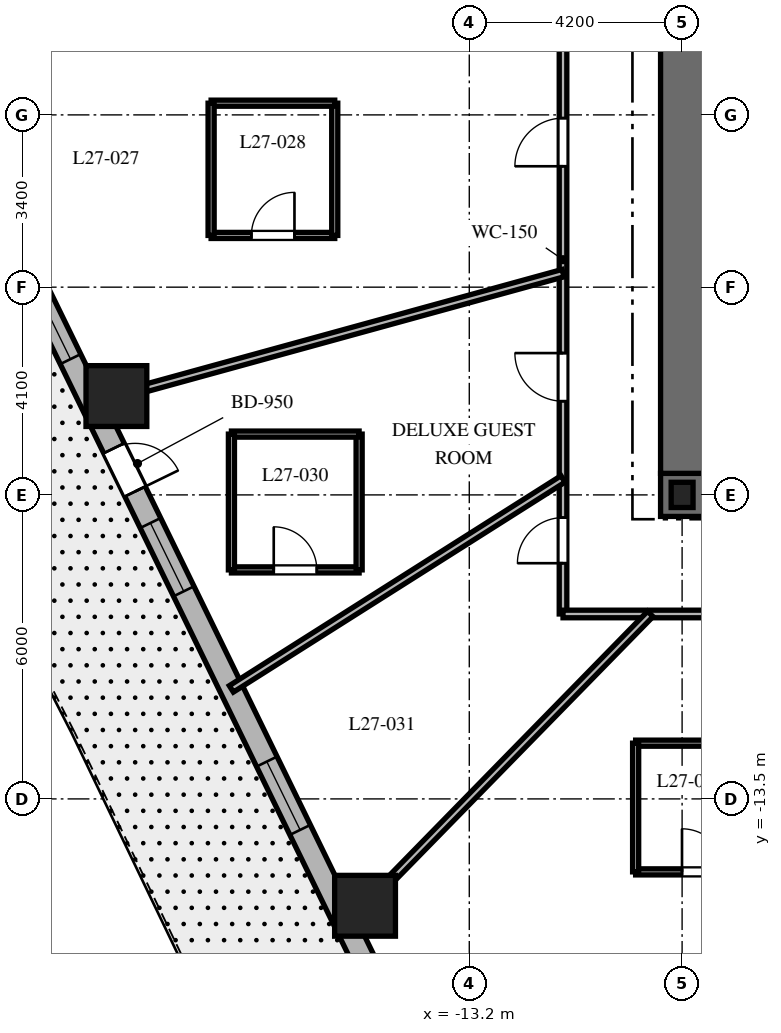
"""IFC4 building model, lengths in metres.
Left out: names, types, materials, properties, quantities, classifications, styles, units other than length and angle.
Written with IfcOpenShell. Run it as: python <this file> out.ifc"""

import sys

from ifc_helpers import new_model, si_unit, direction, frame, frame_2d, origin, origin_2d, place, context, subcontext, project, spatial, rectangle, i_section, extrude, element, fill, save


model = new_model("IFC4")
c1 = context("Model", 3, precision=1e-05, world=origin(), true_north=direction((0.0, 1.0)))
c2 = subcontext(c1, "Body", "Model", "MODEL_VIEW")
j1 = project(units=[si_unit("LENGTHUNIT", "METRE"), si_unit("PLANEANGLEUNIT", "RADIAN")], contexts=[c1])
p1 = place(None, origin())
s1 = spatial("IfcSite", under=j1, at=p1, CompositionType="ELEMENT")
p2 = place(p1, origin())
s2 = spatial("IfcBuilding", under=s1, at=p2, CompositionType="ELEMENT")
p3 = place(p2, frame((0.0, 0.0, 113.6)))
s3 = spatial("IfcBuildingStorey", under=s2, at=p3, CompositionType="ELEMENT", Elevation=113.6)
p4 = place(p3, frame((-9.425, -7.5, 0.0), z_axis=(0.0, 0.0, 1.0), x_axis=(1.0, 0.0, 0.0)))
e1 = element("IfcWall", 1, at=p4, inside=s3, PredefinedType="SHEAR", context=c2, shape_type="SweptSolid", body=[
    extrude(rectangle(XDim=18.85, YDim=0.85, at=frame_2d((9.425, 0.0))), origin(), (0.0, 0.0, 1.0), 3.7),
])
p5 = place(p4, frame((9.475, 0.0, 0.0)))
e2 = element("IfcOpeningElement", 2, at=p5, cuts=e1, PredefinedType="OPENING", context=c2, shape_type="SweptSolid", body=[
    extrude(rectangle(XDim=1.0, YDim=2.15, at=frame_2d((0.5, 1.075))), frame((0.0, 0.435, 0.0), z_axis=(0.0, -1.0, 0.0), x_axis=(1.0, 0.0, 0.0)), (0.0, 0.0, 1.0), 0.87),
])
p6 = place(p3, frame((-9.0, -7.075, 0.0), z_axis=(0.0, 0.0, 1.0), x_axis=(0.0, 1.0, 0.0)))
e3 = element("IfcWall", 3, at=p6, inside=s3, PredefinedType="SHEAR", context=c2, shape_type="SweptSolid", body=[
    extrude(rectangle(XDim=14.15, YDim=0.85, at=frame_2d((7.075, 0.0))), origin(), (0.0, 0.0, 1.0), 3.7),
])
p7 = place(p6, frame((10.2, 0.0, 0.0)))
e4 = element("IfcOpeningElement", 4, at=p7, cuts=e3, PredefinedType="OPENING", context=c2, shape_type="SweptSolid", body=[
    extrude(rectangle(XDim=1.05, YDim=2.15, at=frame_2d((0.525, 1.075))), frame((0.0, 0.435, 0.0), z_axis=(0.0, -1.0, 0.0), x_axis=(1.0, 0.0, 0.0)), (0.0, 0.0, 1.0), 0.87),
])
p8 = place(p3, frame((-9.0, -7.5, 0.0), z_axis=(0.0, 0.0, 1.0), x_axis=(1.0, 0.0, 0.0)))
e5 = element("IfcColumn", 5, at=p8, inside=s3, PredefinedType="COLUMN", context=c2, shape_type="SweptSolid", body=[
    extrude(i_section(OverallWidth=0.432, OverallDepth=0.498, WebThickness=0.056, FlangeThickness=0.089, at=origin_2d()), origin(), (0.0, 0.0, 1.0), 3.7),
])
for number, where, z_axis, x_axis in (
    (6, (-20.164, -5.549, 0.0), (0.0, 0.0, 1.0), (1.0, 0.0, 0.0)),
    (7, (-15.257, -15.609, 0.0), (0.0, 0.0, 1.0), (1.0, 0.0, 0.0)),
):
    element("IfcColumn", number, at=place(p3, frame(where, z_axis=z_axis, x_axis=x_axis)), inside=s3, PredefinedType="COLUMN", context=c2, shape_type="SweptSolid", body=[
        extrude(rectangle(XDim=1.2, YDim=1.2, at=origin_2d()), origin(), (0.0, 0.0, 1.0), 3.7),
    ])
p9 = place(p3, frame((-15.992, 18.777, 0.0), z_axis=(0.0, 0.0, 1.0), x_axis=(-0.325606988926, -0.945505202927, 0.0)))
e8 = element("IfcWall", 8, at=p9, inside=s3, PredefinedType="SOLIDWALL", context=c2, shape_type="SweptSolid", body=[
    extrude(rectangle(XDim=19.669, YDim=0.45, at=frame_2d((9.835, 0.0))), origin(), (0.0, 0.0, 1.0), 3.4),
])
p10 = place(p9, frame((4.909, 0.0, 0.0)))
e9 = element("IfcOpeningElement", 9, at=p10, cuts=e8, PredefinedType="OPENING", context=c2, shape_type="SweptSolid", body=[
    extrude(rectangle(XDim=1.0, YDim=2.15, at=frame_2d((0.5, 1.075))), frame((0.0, 0.235, 0.0), z_axis=(0.0, -1.0, 0.0), x_axis=(1.0, 0.0, 0.0)), (0.0, 0.0, 1.0), 0.47),
])
p11 = place(p9, frame((1.197, 0.0, 0.8)))
e10 = element("IfcOpeningElement", 10, at=p11, cuts=e8, PredefinedType="OPENING", context=c2, shape_type="SweptSolid", body=[
    extrude(rectangle(XDim=1.5, YDim=1.8, at=frame_2d((0.75, 0.9))), frame((0.0, 0.235, 0.0), z_axis=(0.0, -1.0, 0.0), x_axis=(1.0, 0.0, 0.0)), (0.0, 0.0, 1.0), 0.47),
])
p12 = place(p9, frame((6.714, 0.0, 0.8)))
e11 = element("IfcOpeningElement", 11, at=p12, cuts=e8, PredefinedType="OPENING", context=c2, shape_type="SweptSolid", body=[
    extrude(rectangle(XDim=1.5, YDim=1.8, at=frame_2d((0.75, 0.9))), frame((0.0, 0.235, 0.0), z_axis=(0.0, -1.0, 0.0), x_axis=(1.0, 0.0, 0.0)), (0.0, 0.0, 1.0), 0.47),
])
p13 = place(p9, frame((11.53, 0.0, 0.8)))
e12 = element("IfcOpeningElement", 12, at=p13, cuts=e8, PredefinedType="OPENING", context=c2, shape_type="SweptSolid", body=[
    extrude(rectangle(XDim=1.5, YDim=1.8, at=frame_2d((0.75, 0.9))), frame((0.0, 0.235, 0.0), z_axis=(0.0, -1.0, 0.0), x_axis=(1.0, 0.0, 0.0)), (0.0, 0.0, 1.0), 0.47),
])
p14 = place(p9, frame((16.918, 0.0, 0.8)))
e13 = element("IfcOpeningElement", 13, at=p14, cuts=e8, PredefinedType="OPENING", context=c2, shape_type="SweptSolid", body=[
    extrude(rectangle(XDim=1.5, YDim=1.8, at=frame_2d((0.75, 0.9))), frame((0.0, 0.235, 0.0), z_axis=(0.0, -1.0, 0.0), x_axis=(1.0, 0.0, 0.0)), (0.0, 0.0, 1.0), 0.47),
])
p15 = place(p3, frame((-22.238, -2.427, 0.0), z_axis=(0.0, 0.0, 1.0), x_axis=(0.438374803278, -0.898792262901, 0.0)))
e14 = element("IfcWall", 14, at=p15, inside=s3, PredefinedType="SOLIDWALL", context=c2, shape_type="SweptSolid", body=[
    extrude(rectangle(XDim=18.618, YDim=0.45, at=frame_2d((9.309, 0.0))), origin(), (0.0, 0.0, 1.0), 3.4),
])
p16 = place(p15, frame((4.62, 0.0, 0.0)))
e15 = element("IfcOpeningElement", 15, at=p16, cuts=e14, PredefinedType="OPENING", context=c2, shape_type="SweptSolid", body=[
    extrude(rectangle(XDim=0.95, YDim=2.15, at=frame_2d((0.475, 1.075))), frame((0.0, 0.235, 0.0), z_axis=(0.0, -1.0, 0.0), x_axis=(1.0, 0.0, 0.0)), (0.0, 0.0, 1.0), 0.47),
])
p17 = place(p15, frame((1.163, 0.0, 0.8)))
e16 = element("IfcOpeningElement", 16, at=p17, cuts=e14, PredefinedType="OPENING", context=c2, shape_type="SweptSolid", body=[
    extrude(rectangle(XDim=1.5, YDim=1.8, at=frame_2d((0.75, 0.9))), frame((0.0, 0.235, 0.0), z_axis=(0.0, -1.0, 0.0), x_axis=(1.0, 0.0, 0.0)), (0.0, 0.0, 1.0), 0.47),
])
p18 = place(p15, frame((6.262, 0.0, 0.8)))
e17 = element("IfcOpeningElement", 17, at=p18, cuts=e14, PredefinedType="OPENING", context=c2, shape_type="SweptSolid", body=[
    extrude(rectangle(XDim=1.5, YDim=1.8, at=frame_2d((0.75, 0.9))), frame((0.0, 0.235, 0.0), z_axis=(0.0, -1.0, 0.0), x_axis=(1.0, 0.0, 0.0)), (0.0, 0.0, 1.0), 0.47),
])
p19 = place(p15, frame((11.501, 0.0, 0.8)))
e18 = element("IfcOpeningElement", 18, at=p19, cuts=e14, PredefinedType="OPENING", context=c2, shape_type="SweptSolid", body=[
    extrude(rectangle(XDim=1.5, YDim=1.8, at=frame_2d((0.75, 0.9))), frame((0.0, 0.235, 0.0), z_axis=(0.0, -1.0, 0.0), x_axis=(1.0, 0.0, 0.0)), (0.0, 0.0, 1.0), 0.47),
])
p20 = place(p15, frame((16.006, 0.0, 0.8)))
e19 = element("IfcOpeningElement", 19, at=p20, cuts=e14, PredefinedType="OPENING", context=c2, shape_type="SweptSolid", body=[
    extrude(rectangle(XDim=1.5, YDim=1.8, at=frame_2d((0.75, 0.9))), frame((0.0, 0.235, 0.0), z_axis=(0.0, -1.0, 0.0), x_axis=(1.0, 0.0, 0.0)), (0.0, 0.0, 1.0), 0.47),
])
p21 = place(p3, frame((-11.35, -9.85, 0.0), z_axis=(0.0, 0.0, 1.0), x_axis=(0.0, 1.0, 0.0)))
e20 = element("IfcWall", 20, at=p21, inside=s3, PredefinedType="PARTITIONING", context=c2, shape_type="SweptSolid", body=[
    extrude(rectangle(XDim=19.7, YDim=0.15, at=frame_2d((9.85, 0.0))), origin(), (0.0, 0.0, 1.0), 2.84),
])
p22 = place(p21, frame((17.197, 0.0, 0.0)))
e21 = element("IfcOpeningElement", 21, at=p22, cuts=e20, PredefinedType="OPENING", context=c2, shape_type="SweptSolid", body=[
    extrude(rectangle(XDim=0.9, YDim=2.03, at=frame_2d((0.45, 1.015))), frame((0.0, 0.085, 0.0), z_axis=(0.0, -1.0, 0.0), x_axis=(1.0, 0.0, 0.0)), (0.0, 0.0, 1.0), 0.17),
])
p23 = place(p21, frame((13.408, 0.0, 0.0)))
e22 = element("IfcOpeningElement", 22, at=p23, cuts=e20, PredefinedType="OPENING", context=c2, shape_type="SweptSolid", body=[
    extrude(rectangle(XDim=0.95, YDim=2.03, at=frame_2d((0.475, 1.015))), frame((0.0, 0.085, 0.0), z_axis=(0.0, -1.0, 0.0), x_axis=(1.0, 0.0, 0.0)), (0.0, 0.0, 1.0), 0.17),
])
p24 = place(p21, frame((8.836, 0.0, 0.0)))
e23 = element("IfcOpeningElement", 23, at=p24, cuts=e20, PredefinedType="OPENING", context=c2, shape_type="SweptSolid", body=[
    extrude(rectangle(XDim=0.95, YDim=2.03, at=frame_2d((0.475, 1.015))), frame((0.0, 0.085, 0.0), z_axis=(0.0, -1.0, 0.0), x_axis=(1.0, 0.0, 0.0)), (0.0, 0.0, 1.0), 0.17),
])
p25 = place(p21, frame((4.199, 0.0, 0.0)))
e24 = element("IfcOpeningElement", 24, at=p25, cuts=e20, PredefinedType="OPENING", context=c2, shape_type="SweptSolid", body=[
    extrude(rectangle(XDim=0.95, YDim=2.03, at=frame_2d((0.475, 1.015))), frame((0.0, 0.085, 0.0), z_axis=(0.0, -1.0, 0.0), x_axis=(1.0, 0.0, 0.0)), (0.0, 0.0, 1.0), 0.17),
])
p26 = place(p21, frame((1.002, 0.0, 0.0)))
e25 = element("IfcOpeningElement", 25, at=p26, cuts=e20, PredefinedType="OPENING", context=c2, shape_type="SweptSolid", body=[
    extrude(rectangle(XDim=0.9, YDim=2.03, at=frame_2d((0.45, 1.015))), frame((0.0, 0.085, 0.0), z_axis=(0.0, -1.0, 0.0), x_axis=(1.0, 0.0, 0.0)), (0.0, 0.0, 1.0), 0.17),
])
p27 = place(p3, frame((11.35, -9.85, 0.0), z_axis=(0.0, 0.0, 1.0), x_axis=(-1.0, 0.0, 0.0)))
e26 = element("IfcWall", 26, at=p27, inside=s3, PredefinedType="PARTITIONING", context=c2, shape_type="SweptSolid", body=[
    extrude(rectangle(XDim=22.7, YDim=0.15, at=frame_2d((11.35, 0.0))), origin(), (0.0, 0.0, 1.0), 2.84),
])
p28 = place(p27, frame((17.237, 0.0, 0.0)))
e27 = element("IfcOpeningElement", 27, at=p28, cuts=e26, PredefinedType="OPENING", context=c2, shape_type="SweptSolid", body=[
    extrude(rectangle(XDim=0.95, YDim=2.03, at=frame_2d((0.475, 1.015))), frame((0.0, 0.085, 0.0), z_axis=(0.0, -1.0, 0.0), x_axis=(1.0, 0.0, 0.0)), (0.0, 0.0, 1.0), 0.17),
])
p29 = place(p27, frame((12.192, 0.0, 0.0)))
e28 = element("IfcOpeningElement", 28, at=p29, cuts=e26, PredefinedType="OPENING", context=c2, shape_type="SweptSolid", body=[
    extrude(rectangle(XDim=0.95, YDim=2.03, at=frame_2d((0.475, 1.015))), frame((0.0, 0.085, 0.0), z_axis=(0.0, -1.0, 0.0), x_axis=(1.0, 0.0, 0.0)), (0.0, 0.0, 1.0), 0.17),
])
p30 = place(p27, frame((8.757, 0.0, 0.0)))
e29 = element("IfcOpeningElement", 29, at=p30, cuts=e26, PredefinedType="OPENING", context=c2, shape_type="SweptSolid", body=[
    extrude(rectangle(XDim=0.95, YDim=2.03, at=frame_2d((0.475, 1.015))), frame((0.0, 0.085, 0.0), z_axis=(0.0, -1.0, 0.0), x_axis=(1.0, 0.0, 0.0)), (0.0, 0.0, 1.0), 0.17),
])
p31 = place(p27, frame((3.399, 0.0, 0.0)))
e30 = element("IfcOpeningElement", 30, at=p31, cuts=e26, PredefinedType="OPENING", context=c2, shape_type="SweptSolid", body=[
    extrude(rectangle(XDim=0.95, YDim=2.03, at=frame_2d((0.475, 1.015))), frame((0.0, 0.085, 0.0), z_axis=(0.0, -1.0, 0.0), x_axis=(1.0, 0.0, 0.0)), (0.0, 0.0, 1.0), 0.17),
])
p32 = place(p3, frame((-11.35, -3.123, 0.0), z_axis=(0.0, 0.0, 1.0), x_axis=(-0.964151983214, -0.265350623261, 0.0)))
e31 = element("IfcWall", 31, at=p32, inside=s3, PredefinedType="PARTITIONING", context=c2, shape_type="SweptSolid", body=[
    extrude(rectangle(XDim=9.645, YDim=0.15, at=frame_2d((4.823, 0.0))), origin(), (0.0, 0.0, 1.0), 2.54),
])
p33 = place(p3, frame((-11.35, -7.185, 0.0), z_axis=(0.0, 0.0, 1.0), x_axis=(-0.844928274737, -0.534879622485, 0.0)))
e32 = element("IfcWall", 32, at=p33, inside=s3, PredefinedType="PARTITIONING", context=c2, shape_type="SweptSolid", body=[
    extrude(rectangle(XDim=7.747, YDim=0.15, at=frame_2d((3.874, 0.0))), origin(), (0.0, 0.0, 1.0), 2.54),
])
p34 = place(p3, frame((-9.628, -9.85, 0.0), z_axis=(0.0, 0.0, 1.0), x_axis=(-0.698992824326, -0.715128681805, 0.0)))
e33 = element("IfcWall", 33, at=p34, inside=s3, PredefinedType="PARTITIONING", context=c2, shape_type="SweptSolid", body=[
    extrude(rectangle(XDim=8.579, YDim=0.15, at=frame_2d((4.29, 0.0))), origin(), (0.0, 0.0, 1.0), 2.54),
])
p35 = place(p3, frame((-18.295, -2.379, 0.0), z_axis=(0.0, 0.0, 1.0), x_axis=(1.0, 0.0, 0.0)))
e34 = element("IfcWall", 34, at=p35, inside=s3, PredefinedType="PARTITIONING", context=c2, shape_type="SweptSolid", body=[
    extrude(rectangle(XDim=2.44, YDim=0.12, at=frame_2d((1.22, 0.0))), origin(), (0.0, 0.0, 1.0), 2.84),
])
p36 = place(p35, frame((0.795, 0.0, 0.0)))
e35 = element("IfcOpeningElement", 35, at=p36, cuts=e34, PredefinedType="OPENING", context=c2, shape_type="SweptSolid", body=[
    extrude(rectangle(XDim=0.85, YDim=2.03, at=frame_2d((0.425, 1.015))), frame((0.0, 0.07, 0.0), z_axis=(0.0, -1.0, 0.0), x_axis=(1.0, 0.0, 0.0)), (0.0, 0.0, 1.0), 0.14),
])
p37 = place(p3, frame((-15.855, -2.379, 0.0), z_axis=(0.0, 0.0, 1.0), x_axis=(0.0, 1.0, 0.0)))
e36 = element("IfcWall", 36, at=p37, inside=s3, PredefinedType="PARTITIONING", context=c2, shape_type="SweptSolid", body=[
    extrude(rectangle(XDim=2.61, YDim=0.12, at=frame_2d((1.305, 0.0))), origin(), (0.0, 0.0, 1.0), 3.4),
])
p38 = place(p3, frame((-15.855, 0.231, 0.0), z_axis=(0.0, 0.0, 1.0), x_axis=(-1.0, 0.0, 0.0)))
e37 = element("IfcWall", 37, at=p38, inside=s3, PredefinedType="PARTITIONING", context=c2, shape_type="SweptSolid", body=[
    extrude(rectangle(XDim=2.44, YDim=0.12, at=frame_2d((1.22, 0.0))), origin(), (0.0, 0.0, 1.0), 2.84),
])
p39 = place(p3, frame((-18.295, 0.231, 0.0), z_axis=(0.0, 0.0, 1.0), x_axis=(0.0, -1.0, 0.0)))
e38 = element("IfcWall", 38, at=p39, inside=s3, PredefinedType="PARTITIONING", context=c2, shape_type="SweptSolid", body=[
    extrude(rectangle(XDim=2.61, YDim=0.12, at=frame_2d((1.305, 0.0))), origin(), (0.0, 0.0, 1.0), 3.4),
])
p40 = place(p3, frame((-17.894, -8.98, 0.0), z_axis=(0.0, 0.0, 1.0), x_axis=(1.0, 0.0, 0.0)))
e39 = element("IfcWall", 39, at=p40, inside=s3, PredefinedType="PARTITIONING", context=c2, shape_type="SweptSolid", body=[
    extrude(rectangle(XDim=2.52, YDim=0.12, at=frame_2d((1.26, 0.0))), origin(), (0.0, 0.0, 1.0), 3.4),
])
p41 = place(p40, frame((0.835, 0.0, 0.0)))
e40 = element("IfcOpeningElement", 40, at=p41, cuts=e39, PredefinedType="OPENING", context=c2, shape_type="SweptSolid", body=[
    extrude(rectangle(XDim=0.85, YDim=2.03, at=frame_2d((0.425, 1.015))), frame((0.0, 0.07, 0.0), z_axis=(0.0, -1.0, 0.0), x_axis=(1.0, 0.0, 0.0)), (0.0, 0.0, 1.0), 0.14),
])
p42 = place(p3, frame((-15.374, -8.98, 0.0), z_axis=(0.0, 0.0, 1.0), x_axis=(0.0, 1.0, 0.0)))
e41 = element("IfcWall", 41, at=p42, inside=s3, PredefinedType="PARTITIONING", context=c2, shape_type="SweptSolid", body=[
    extrude(rectangle(XDim=2.68, YDim=0.12, at=frame_2d((1.34, 0.0))), origin(), (0.0, 0.0, 1.0), 2.84),
])
p43 = place(p3, frame((-15.374, -6.3, 0.0), z_axis=(0.0, 0.0, 1.0), x_axis=(-1.0, 0.0, 0.0)))
e42 = element("IfcWall", 42, at=p43, inside=s3, PredefinedType="PARTITIONING", context=c2, shape_type="SweptSolid", body=[
    extrude(rectangle(XDim=2.52, YDim=0.12, at=frame_2d((1.26, 0.0))), origin(), (0.0, 0.0, 1.0), 2.84),
])
p44 = place(p3, frame((-17.894, -6.3, 0.0), z_axis=(0.0, 0.0, 1.0), x_axis=(0.0, -1.0, 0.0)))
e43 = element("IfcWall", 43, at=p44, inside=s3, PredefinedType="PARTITIONING", context=c2, shape_type="SweptSolid", body=[
    extrude(rectangle(XDim=2.68, YDim=0.12, at=frame_2d((1.34, 0.0))), origin(), (0.0, 0.0, 1.0), 3.4),
])
p45 = place(p3, frame((-9.917, -14.94, 0.0), z_axis=(0.0, 0.0, 1.0), x_axis=(1.0, 0.0, 0.0)))
e44 = element("IfcWall", 44, at=p45, inside=s3, PredefinedType="PARTITIONING", context=c2, shape_type="SweptSolid", body=[
    extrude(rectangle(XDim=2.68, YDim=0.12, at=frame_2d((1.34, 0.0))), origin(), (0.0, 0.0, 1.0), 2.972),
])
p46 = place(p45, frame((0.915, 0.0, 0.0)))
e45 = element("IfcOpeningElement", 45, at=p46, cuts=e44, PredefinedType="OPENING", context=c2, shape_type="SweptSolid", body=[
    extrude(rectangle(XDim=0.85, YDim=2.03, at=frame_2d((0.425, 1.015))), frame((0.0, 0.07, 0.0), z_axis=(0.0, -1.0, 0.0), x_axis=(1.0, 0.0, 0.0)), (0.0, 0.0, 1.0), 0.14),
])
p47 = place(p3, frame((-7.237, -12.4, 0.0), z_axis=(0.0, 0.0, 1.0), x_axis=(-1.0, 0.0, 0.0)))
e46 = element("IfcWall", 46, at=p47, inside=s3, PredefinedType="PARTITIONING", context=c2, shape_type="SweptSolid", body=[
    extrude(rectangle(XDim=2.68, YDim=0.12, at=frame_2d((1.34, 0.0))), origin(), (0.0, 0.0, 1.0), 2.84),
])
p48 = place(p3, frame((-9.917, -12.4, 0.0), z_axis=(0.0, 0.0, 1.0), x_axis=(0.0, -1.0, 0.0)))
e47 = element("IfcWall", 47, at=p48, inside=s3, PredefinedType="PARTITIONING", context=c2, shape_type="SweptSolid", body=[
    extrude(rectangle(XDim=2.54, YDim=0.12, at=frame_2d((1.27, 0.0))), origin(), (0.0, 0.0, 1.0), 2.972),
])
p49 = place(p16, origin())
e48 = element("IfcDoor", 48, at=p49, inside=s3, OperationType="SINGLE_SWING_RIGHT", PredefinedType="DOOR", context=c2, shape_type="SweptSolid", body=[
    extrude(rectangle(XDim=0.95, YDim=2.15, at=frame_2d((0.475, 1.075))), frame((0.0, 0.025, 0.0), z_axis=(0.0, -1.0, 0.0), x_axis=(1.0, 0.0, 0.0)), (0.0, 0.0, 1.0), 0.05),
])
fill(e15, e48)
p50 = place(p17, origin())
e49 = element("IfcWindow", 49, at=p50, inside=s3, PartitioningType="SINGLE_PANEL", PredefinedType="WINDOW", context=c2, shape_type="SweptSolid", body=[
    extrude(rectangle(XDim=1.5, YDim=1.8, at=frame_2d((0.75, 0.9))), frame((0.0, 0.03, 0.0), z_axis=(0.0, -1.0, 0.0), x_axis=(1.0, 0.0, 0.0)), (0.0, 0.0, 1.0), 0.06),
])
fill(e16, e49)
p51 = place(p18, origin())
e50 = element("IfcWindow", 50, at=p51, inside=s3, PartitioningType="SINGLE_PANEL", PredefinedType="WINDOW", context=c2, shape_type="SweptSolid", body=[
    extrude(rectangle(XDim=1.5, YDim=1.8, at=frame_2d((0.75, 0.9))), frame((0.0, 0.03, 0.0), z_axis=(0.0, -1.0, 0.0), x_axis=(1.0, 0.0, 0.0)), (0.0, 0.0, 1.0), 0.06),
])
fill(e17, e50)
p52 = place(p19, origin())
e51 = element("IfcWindow", 51, at=p52, inside=s3, PartitioningType="SINGLE_PANEL", PredefinedType="WINDOW", context=c2, shape_type="SweptSolid", body=[
    extrude(rectangle(XDim=1.5, YDim=1.8, at=frame_2d((0.75, 0.9))), frame((0.0, 0.03, 0.0), z_axis=(0.0, -1.0, 0.0), x_axis=(1.0, 0.0, 0.0)), (0.0, 0.0, 1.0), 0.06),
])
fill(e18, e51)
p53 = place(p24, origin())
e52 = element("IfcDoor", 52, at=p53, inside=s3, OperationType="SINGLE_SWING_LEFT", PredefinedType="DOOR", context=c2, shape_type="SweptSolid", body=[
    extrude(rectangle(XDim=0.95, YDim=2.03, at=frame_2d((0.475, 1.015))), frame((0.0, 0.025, 0.0), z_axis=(0.0, -1.0, 0.0), x_axis=(1.0, 0.0, 0.0)), (0.0, 0.0, 1.0), 0.05),
])
fill(e23, e52)
p54 = place(p36, origin())
e53 = element("IfcDoor", 53, at=p54, inside=s3, OperationType="SINGLE_SWING_RIGHT", PredefinedType="DOOR", context=c2, shape_type="SweptSolid", body=[
    extrude(rectangle(XDim=0.85, YDim=2.03, at=frame_2d((0.425, 1.015))), frame((0.0, 0.025, 0.0), z_axis=(0.0, -1.0, 0.0), x_axis=(1.0, 0.0, 0.0)), (0.0, 0.0, 1.0), 0.05),
])
fill(e35, e53)
p55 = place(p25, origin())
e54 = element("IfcDoor", 54, at=p55, inside=s3, OperationType="SINGLE_SWING_RIGHT", PredefinedType="DOOR", context=c2, shape_type="SweptSolid", body=[
    extrude(rectangle(XDim=0.95, YDim=2.03, at=frame_2d((0.475, 1.015))), frame((0.0, 0.025, 0.0), z_axis=(0.0, -1.0, 0.0), x_axis=(1.0, 0.0, 0.0)), (0.0, 0.0, 1.0), 0.05),
])
fill(e24, e54)
p56 = place(p41, origin())
e55 = element("IfcDoor", 55, at=p56, inside=s3, OperationType="SINGLE_SWING_LEFT", PredefinedType="DOOR", context=c2, shape_type="SweptSolid", body=[
    extrude(rectangle(XDim=0.85, YDim=2.03, at=frame_2d((0.425, 1.015))), frame((0.0, 0.025, 0.0), z_axis=(0.0, -1.0, 0.0), x_axis=(1.0, 0.0, 0.0)), (0.0, 0.0, 1.0), 0.05),
])
fill(e40, e55)
p57 = place(p26, origin())
e56 = element("IfcDoor", 56, at=p57, inside=s3, OperationType="SINGLE_SWING_LEFT", PredefinedType="DOOR", context=c2, shape_type="SweptSolid", body=[
    extrude(rectangle(XDim=0.9, YDim=2.03, at=frame_2d((0.45, 1.015))), frame((0.0, 0.025, 0.0), z_axis=(0.0, -1.0, 0.0), x_axis=(1.0, 0.0, 0.0)), (0.0, 0.0, 1.0), 0.05),
])
fill(e25, e56)
p58 = place(p46, origin())
e57 = element("IfcDoor", 57, at=p58, inside=s3, OperationType="SINGLE_SWING_LEFT", PredefinedType="DOOR", context=c2, shape_type="SweptSolid", body=[
    extrude(rectangle(XDim=0.85, YDim=2.03, at=frame_2d((0.425, 1.015))), frame((0.0, 0.025, 0.0), z_axis=(0.0, -1.0, 0.0), x_axis=(1.0, 0.0, 0.0)), (0.0, 0.0, 1.0), 0.05),
])
fill(e45, e57)
save(model, sys.argv[1])
